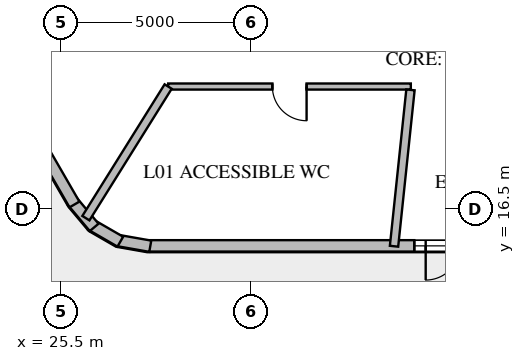
"""IFC4 building model, lengths in metres.
Left out: names, types, materials, properties, quantities, classifications, styles, units other than length and angle.
Written with IfcOpenShell. Run it as: python <this file> out.ifc"""

import sys

from ifc_helpers import new_model, si_unit, direction, frame, frame_2d, origin, place, context, subcontext, project, spatial, rectangle, extrude, element, fill, save


model = new_model("IFC4")
c1 = context("Model", 3, precision=1e-05, world=origin(), true_north=direction((0.0, 1.0)))
c2 = subcontext(c1, "Body", "Model", "MODEL_VIEW")
j1 = project(units=[si_unit("LENGTHUNIT", "METRE"), si_unit("PLANEANGLEUNIT", "RADIAN")], contexts=[c1])
p1 = place(None, origin())
s1 = spatial("IfcSite", under=j1, at=p1, CompositionType="ELEMENT")
p2 = place(p1, origin())
s2 = spatial("IfcBuilding", under=s1, at=p2, CompositionType="ELEMENT")
p3 = place(p2, origin())
s3 = spatial("IfcBuildingStorey", under=s2, at=p3, CompositionType="ELEMENT", Elevation=0.0)
p4 = place(p3, frame((44.256, 15.522, 0.0), z_axis=(0.0, 0.0, 1.0), x_axis=(-1.0, 0.0, 0.0)))
e1 = element("IfcWall", 1, at=p4, inside=s3, PredefinedType="SOLIDWALL", context=c2, shape_type="SweptSolid", body=[
    extrude(rectangle(XDim=16.513, YDim=0.3, at=frame_2d((8.256, 0.0))), origin(), (0.0, 0.0, 1.0), 5.95),
])
p5 = place(p4, frame((7.356, 0.0, 0.0)))
e2 = element("IfcOpeningElement", 2, at=p5, cuts=e1, PredefinedType="OPENING", context=c2, shape_type="SweptSolid", body=[
    extrude(rectangle(XDim=1.8, YDim=2.4, at=frame_2d((0.9, 1.2))), frame((0.0, 0.162, 0.0), z_axis=(0.0, -1.0, 0.0), x_axis=(1.0, 0.0, 0.0)), (0.0, 0.0, 1.0), 0.324),
])
p6 = place(p4, frame((7.056, 0.0, 4.5)))
e3 = element("IfcOpeningElement", 3, at=p6, cuts=e1, PredefinedType="OPENING", context=c2, shape_type="SweptSolid", body=[
    extrude(rectangle(XDim=2.4, YDim=1.6, at=frame_2d((1.2, 0.8))), frame((0.0, 0.162, 0.0), z_axis=(0.0, -1.0, 0.0), x_axis=(1.0, 0.0, 0.0)), (0.0, 0.0, 1.0), 0.324),
])
p7 = place(p3, frame((27.853, 15.513, 0.0), z_axis=(0.0, 0.0, 1.0), x_axis=(-0.984802587151, 0.173677472172, 0.0)))
e4 = element("IfcWall", 4, at=p7, inside=s3, PredefinedType="SOLIDWALL", context=c2, shape_type="SweptSolid", body=[
    extrude(rectangle(XDim=0.904, YDim=0.3, at=frame_2d((0.452, 0.0))), origin(), (0.0, 0.0, 1.0), 7.35),
])
p8 = place(p3, frame((27.064, 15.633, 0.0), z_axis=(0.0, 0.0, 1.0), x_axis=(-0.866007538022, 0.500030943131, 0.0)))
e5 = element("IfcWall", 5, at=p8, inside=s3, PredefinedType="SOLIDWALL", context=c2, shape_type="SweptSolid", body=[
    extrude(rectangle(XDim=0.891, YDim=0.3, at=frame_2d((0.445, 0.0))), origin(), (0.0, 0.0, 1.0), 7.35),
])
p9 = place(p3, frame((26.376, 16.008, 0.0), z_axis=(0.0, 0.0, 1.0), x_axis=(-0.64283728984, 0.766002753775, 0.0)))
e6 = element("IfcWall", 6, at=p9, inside=s3, PredefinedType="SOLIDWALL", context=c2, shape_type="SweptSolid", body=[
    extrude(rectangle(XDim=0.904, YDim=0.3, at=frame_2d((0.452, 0.0))), origin(), (0.0, 0.0, 1.0), 7.35),
])
p10 = place(p3, frame((25.858, 16.611, 0.0), z_axis=(0.0, 0.0, 1.0), x_axis=(-0.49999847728, 0.866026282926, 0.0)))
e7 = element("IfcWall", 7, at=p10, inside=s3, PredefinedType="SOLIDWALL", context=c2, shape_type="SweptSolid", body=[
    extrude(rectangle(XDim=16.512, YDim=0.3, at=frame_2d((8.256, 0.0))), origin(), (0.0, 0.0, 1.0), 5.95),
])
p11 = place(p10, frame((8.606, 0.0, 0.0)))
e8 = element("IfcOpeningElement", 8, at=p11, cuts=e7, PredefinedType="OPENING", context=c2, shape_type="SweptSolid", body=[
    extrude(rectangle(XDim=2.0, YDim=2.5, at=frame_2d((1.0, 1.25))), frame((0.0, 0.162, 0.0), z_axis=(0.0, -1.0, 0.0), x_axis=(1.0, 0.0, 0.0)), (0.0, 0.0, 1.0), 0.324),
])
p12 = place(p10, frame((7.056, 0.0, 4.5)))
e9 = element("IfcOpeningElement", 9, at=p12, cuts=e7, PredefinedType="OPENING", context=c2, shape_type="SweptSolid", body=[
    extrude(rectangle(XDim=2.4, YDim=1.6, at=frame_2d((1.2, 0.8))), frame((0.0, 0.162, 0.0), z_axis=(0.0, -1.0, 0.0), x_axis=(1.0, 0.0, 0.0)), (0.0, 0.0, 1.0), 0.324),
])
p13 = place(p3, frame((28.323, 19.715, 0.0), z_axis=(0.0, 0.0, 1.0), x_axis=(1.0, 0.0, 0.0)))
e10 = element("IfcWall", 10, at=p13, inside=s3, PredefinedType="PARTITIONING", context=c2, shape_type="SweptSolid", body=[
    extrude(rectangle(XDim=6.385, YDim=0.16, at=frame_2d((3.193, 0.0))), origin(), (0.0, 0.0, 1.0), 5.95),
])
p14 = place(p13, frame((2.743, 0.0, 0.0)))
e11 = element("IfcOpeningElement", 11, at=p14, cuts=e10, PredefinedType="OPENING", context=c2, shape_type="SweptSolid", body=[
    extrude(rectangle(XDim=0.9, YDim=2.1, at=frame_2d((0.45, 1.05))), frame((0.0, 0.092, 0.0), z_axis=(0.0, -1.0, 0.0), x_axis=(1.0, 0.0, 0.0)), (0.0, 0.0, 1.0), 0.184),
])
p15 = place(p3, frame((28.323, 19.715, 0.0), z_axis=(0.0, 0.0, 1.0), x_axis=(-0.529918340132, -0.848048673598, 0.0)))
e12 = element("IfcWall", 12, at=p15, inside=s3, PredefinedType="PARTITIONING", context=c2, shape_type="SweptSolid", body=[
    extrude(rectangle(XDim=4.084, YDim=0.22, at=frame_2d((2.042, 0.0))), origin(), (0.0, 0.0, 1.0), 7.35),
])
p16 = place(p3, frame((34.699, 19.627, 0.0), z_axis=(0.0, 0.0, 1.0), x_axis=(-0.1045035548, -0.994524513038, 0.0)))
e13 = element("IfcWall", 13, at=p16, inside=s3, PredefinedType="PARTITIONING", context=c2, shape_type="SweptSolid", body=[
    extrude(rectangle(XDim=4.137, YDim=0.22, at=frame_2d((2.069, 0.0))), origin(), (0.0, 0.0, 1.0), 7.35),
])
p17 = place(p5, origin())
e14 = element("IfcDoor", 14, at=p17, inside=s3, OperationType="DOUBLE_DOOR_SINGLE_SWING", PredefinedType="USERDEFINED", context=c2, shape_type="SweptSolid", body=[
    extrude(rectangle(XDim=1.8, YDim=2.4, at=frame_2d((0.9, 1.2))), frame((0.0, 0.025, 0.0), z_axis=(0.0, -1.0, 0.0), x_axis=(1.0, 0.0, 0.0)), (0.0, 0.0, 1.0), 0.05),
])
fill(e2, e14)
p18 = place(p6, origin())
e15 = element("IfcWindow", 15, at=p18, inside=s3, PartitioningType="SINGLE_PANEL", PredefinedType="WINDOW", context=c2, shape_type="SweptSolid", body=[
    extrude(rectangle(XDim=2.4, YDim=1.6, at=frame_2d((1.2, 0.8))), frame((0.0, 0.03, 0.0), z_axis=(0.0, -1.0, 0.0), x_axis=(1.0, 0.0, 0.0)), (0.0, 0.0, 1.0), 0.06),
])
fill(e3, e15)
p19 = place(p14, frame((0.9, 0.0, 0.0), z_axis=(0.0, 0.0, 1.0), x_axis=(-1.0, 0.0, 0.0)))
e16 = element("IfcDoor", 16, at=p19, inside=s3, OperationType="SINGLE_SWING_LEFT", PredefinedType="DOOR", context=c2, shape_type="SweptSolid", body=[
    extrude(rectangle(XDim=0.9, YDim=2.1, at=frame_2d((0.45, 1.05))), frame((0.0, 0.025, 0.0), z_axis=(0.0, -1.0, 0.0), x_axis=(1.0, 0.0, 0.0)), (0.0, 0.0, 1.0), 0.05),
])
fill(e11, e16)
save(model, sys.argv[1])
